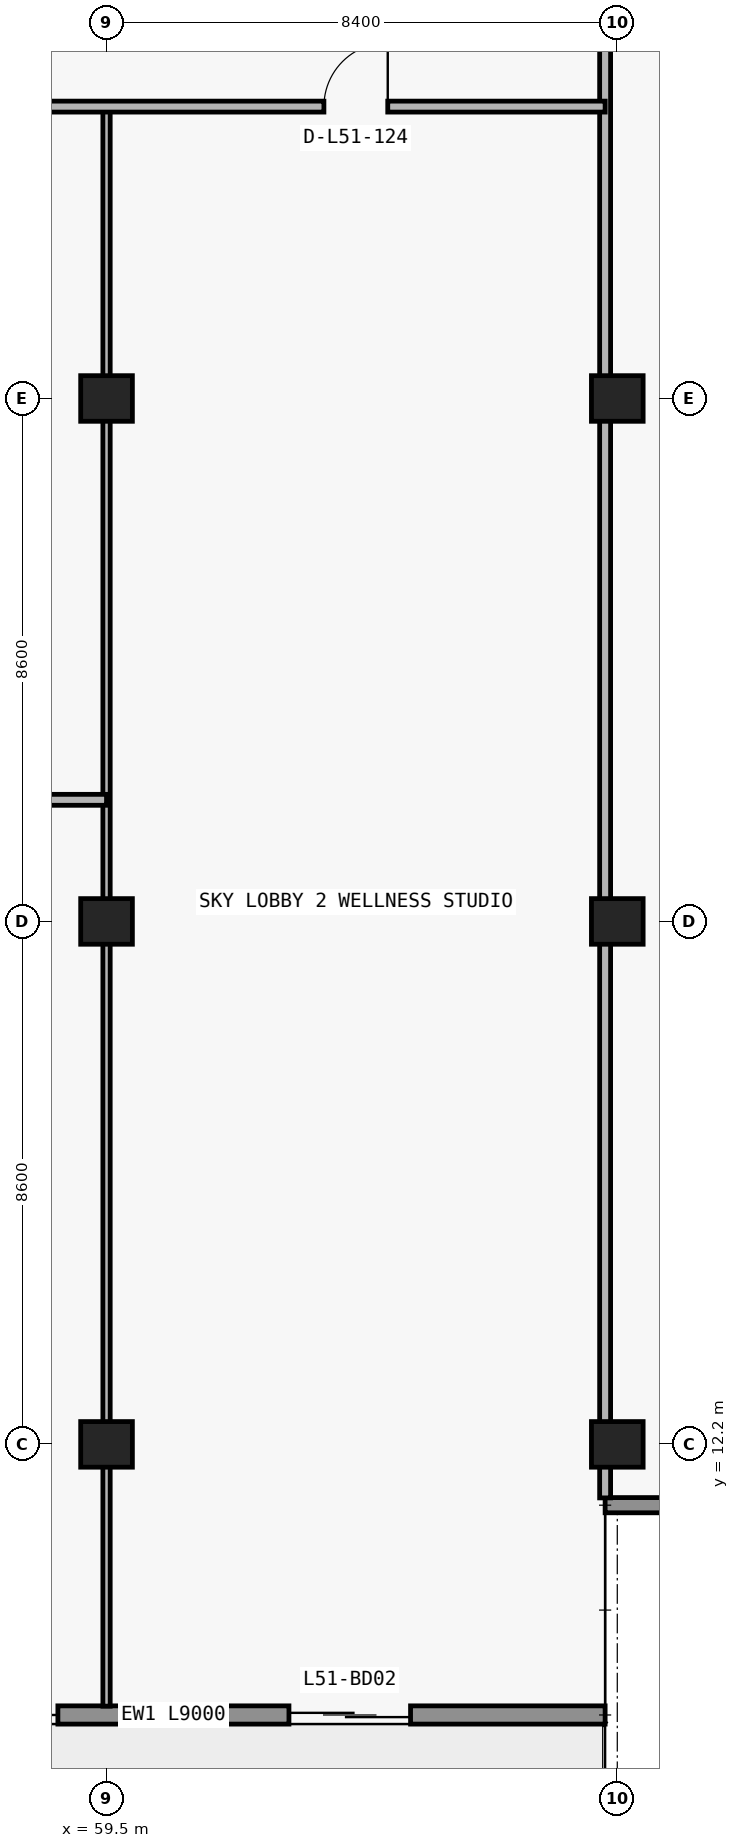
"""IFC4 building model, lengths in metres.
Left out: names, types, materials, properties, quantities, classifications, styles, units other than length and angle.
Written with IfcOpenShell. Run it as: python <this file> out.ifc"""

import sys

from ifc_helpers import new_model, si_unit, direction, frame, frame_2d, origin, origin_2d, place, context, subcontext, project, spatial, rectangle, extrude, element, fill, save


model = new_model("IFC4")
c1 = context("Model", 3, precision=1e-05, world=origin(), true_north=direction((0.0, 1.0)))
c2 = subcontext(c1, "Body", "Model", "MODEL_VIEW")
j1 = project(units=[si_unit("LENGTHUNIT", "METRE"), si_unit("PLANEANGLEUNIT", "RADIAN")], contexts=[c1])
p1 = place(None, origin())
s1 = spatial("IfcSite", under=j1, at=p1, CompositionType="ELEMENT")
p2 = place(p1, origin())
s2 = spatial("IfcBuilding", under=s1, at=p2, CompositionType="ELEMENT")
p3 = place(p2, frame((0.0, 0.0, 183.6)))
s3 = spatial("IfcBuildingStorey", under=s2, at=p3, CompositionType="ELEMENT", Elevation=183.6)
for number, where, z_axis, x_axis in (
    (1, (59.5, 12.2, 0.0), (0.0, 0.0, 1.0), (1.0, 0.0, 0.0)),
    (2, (67.9, 12.2, 0.0), (0.0, 0.0, 1.0), (1.0, 0.0, 0.0)),
    (3, (59.5, 20.8, 0.0), (0.0, 0.0, 1.0), (1.0, 0.0, 0.0)),
    (4, (67.9, 20.8, 0.0), (0.0, 0.0, 1.0), (1.0, 0.0, 0.0)),
    (5, (59.5, 29.4, 0.0), (0.0, 0.0, 1.0), (1.0, 0.0, 0.0)),
    (6, (67.9, 29.4, 0.0), (0.0, 0.0, 1.0), (1.0, 0.0, 0.0)),
):
    element("IfcColumn", number, at=place(p3, frame(where, z_axis=z_axis, x_axis=x_axis)), inside=s3, PredefinedType="COLUMN", context=c2, shape_type="SweptSolid", body=[
        extrude(rectangle(XDim=0.85, YDim=0.75, at=origin_2d()), origin(), (0.0, 0.0, 1.0), 4.55),
    ])
p4 = place(p3, frame((67.7, 7.75, 0.0), z_axis=(0.0, 0.0, 1.0), x_axis=(-1.0, 0.0, 0.0)))
e7 = element("IfcWall", 7, at=p4, inside=s3, PredefinedType="STANDARD", context=c2, shape_type="SweptSolid", body=[
    extrude(rectangle(XDim=9.0, YDim=0.3, at=frame_2d((4.5, 0.0))), origin(), (0.0, 0.0, 1.0), 4.55),
])
p5 = place(p4, frame((3.2, 0.0, 0.0)))
e8 = element("IfcOpeningElement", 8, at=p5, cuts=e7, PredefinedType="OPENING", context=c2, shape_type="SweptSolid", body=[
    extrude(rectangle(XDim=2.0, YDim=2.3, at=frame_2d((1.0, 1.15))), frame((0.0, 0.16, 0.0), z_axis=(0.0, -1.0, 0.0), x_axis=(1.0, 0.0, 0.0)), (0.0, 0.0, 1.0), 0.32),
])
p6 = place(p3, frame((67.7, 11.2, 0.0), z_axis=(0.0, 0.0, 1.0), x_axis=(1.0, 0.0, 0.0)))
e9 = element("IfcWall", 9, at=p6, inside=s3, PredefinedType="ELEMENTEDWALL", context=c2, shape_type="SweptSolid", body=[
    extrude(rectangle(XDim=3.85, YDim=0.25, at=frame_2d((1.925, 0.0))), origin(), (0.0, 0.0, 1.0), 4.55),
])
p7 = place(p3, frame((59.5, 7.895, 0.0), z_axis=(0.0, 0.0, 1.0), x_axis=(0.0, 1.0, 0.0)))
e10 = element("IfcWall", 10, at=p7, inside=s3, PredefinedType="PARTITIONING", context=c2, shape_type="SweptSolid", body=[
    extrude(rectangle(XDim=26.305, YDim=0.12, at=frame_2d((13.152, 0.0))), origin(), (0.0, 0.0, 1.0), 3.514),
])
p8 = place(p3, frame((67.7, 11.32, 0.0), z_axis=(0.0, 0.0, 1.0), x_axis=(0.0, 1.0, 0.0)))
e11 = element("IfcWall", 11, at=p8, inside=s3, PredefinedType="PARTITIONING", context=c2, shape_type="SweptSolid", body=[
    extrude(rectangle(XDim=35.56, YDim=0.18, at=frame_2d((17.78, 0.0))), origin(), (0.0, 0.0, 1.0), 3.514),
])
p9 = place(p3, frame((51.32, 22.8, 0.0), z_axis=(0.0, 0.0, 1.0), x_axis=(1.0, 0.0, 0.0)))
e12 = element("IfcWall", 12, at=p9, inside=s3, PredefinedType="PARTITIONING", context=c2, shape_type="SweptSolid", body=[
    extrude(rectangle(XDim=8.18, YDim=0.18, at=frame_2d((4.09, 0.0))), origin(), (0.0, 0.0, 1.0), 4.55),
])
p10 = place(p9, frame((3.59, 0.0, 0.0)))
e13 = element("IfcOpeningElement", 13, at=p10, cuts=e12, PredefinedType="OPENING", context=c2, shape_type="SweptSolid", body=[
    extrude(rectangle(XDim=1.0, YDim=2.2, at=frame_2d((0.5, 1.1))), frame((0.0, 0.1, 0.0), z_axis=(0.0, -1.0, 0.0), x_axis=(1.0, 0.0, 0.0)), (0.0, 0.0, 1.0), 0.2),
])
p11 = place(p3, frame((10.1, 34.2, 0.0), z_axis=(0.0, 0.0, 1.0), x_axis=(1.0, 0.0, 0.0)))
e14 = element("IfcWall", 14, at=p11, inside=s3, PredefinedType="PARTITIONING", context=c2, shape_type="SweptSolid", body=[
    extrude(rectangle(XDim=57.6, YDim=0.18, at=frame_2d((28.8, 0.0))), origin(), (0.0, 0.0, 1.0), 4.55),
])
p12 = place(p11, frame((44.675, 0.0, 0.0)))
e15 = element("IfcOpeningElement", 15, at=p12, cuts=e14, PredefinedType="OPENING", context=c2, shape_type="SweptSolid", body=[
    extrude(rectangle(XDim=1.05, YDim=2.15, at=frame_2d((0.525, 1.075))), frame((0.0, 0.1, 0.0), z_axis=(0.0, -1.0, 0.0), x_axis=(1.0, 0.0, 0.0)), (0.0, 0.0, 1.0), 0.2),
])
p13 = place(p11, frame((52.975, 0.0, 0.0)))
e16 = element("IfcOpeningElement", 16, at=p13, cuts=e14, PredefinedType="OPENING", context=c2, shape_type="SweptSolid", body=[
    extrude(rectangle(XDim=1.05, YDim=2.15, at=frame_2d((0.525, 1.075))), frame((0.0, 0.1, 0.0), z_axis=(0.0, -1.0, 0.0), x_axis=(1.0, 0.0, 0.0)), (0.0, 0.0, 1.0), 0.2),
])
p14 = place(p11, frame((3.575, 0.0, 0.0)))
e17 = element("IfcOpeningElement", 17, at=p14, cuts=e14, PredefinedType="OPENING", context=c2, shape_type="SweptSolid", body=[
    extrude(rectangle(XDim=1.05, YDim=2.15, at=frame_2d((0.525, 1.075))), frame((0.0, 0.1, 0.0), z_axis=(0.0, -1.0, 0.0), x_axis=(1.0, 0.0, 0.0)), (0.0, 0.0, 1.0), 0.2),
])
p15 = place(p11, frame((11.875, 0.0, 0.0)))
e18 = element("IfcOpeningElement", 18, at=p15, cuts=e14, PredefinedType="OPENING", context=c2, shape_type="SweptSolid", body=[
    extrude(rectangle(XDim=1.05, YDim=2.15, at=frame_2d((0.525, 1.075))), frame((0.0, 0.1, 0.0), z_axis=(0.0, -1.0, 0.0), x_axis=(1.0, 0.0, 0.0)), (0.0, 0.0, 1.0), 0.2),
])
p16 = place(p11, frame((20.275, 0.0, 0.0)))
e19 = element("IfcOpeningElement", 19, at=p16, cuts=e14, PredefinedType="OPENING", context=c2, shape_type="SweptSolid", body=[
    extrude(rectangle(XDim=1.05, YDim=2.15, at=frame_2d((0.525, 1.075))), frame((0.0, 0.1, 0.0), z_axis=(0.0, -1.0, 0.0), x_axis=(1.0, 0.0, 0.0)), (0.0, 0.0, 1.0), 0.2),
])
p17 = place(p11, frame((28.3, 0.0, 0.0)))
e20 = element("IfcOpeningElement", 20, at=p17, cuts=e14, PredefinedType="OPENING", context=c2, shape_type="SweptSolid", body=[
    extrude(rectangle(XDim=1.0, YDim=2.2, at=frame_2d((0.5, 1.1))), frame((0.0, 0.1, 0.0), z_axis=(0.0, -1.0, 0.0), x_axis=(1.0, 0.0, 0.0)), (0.0, 0.0, 1.0), 0.2),
])
p18 = place(p11, frame((36.3, 0.0, 0.0)))
e21 = element("IfcOpeningElement", 21, at=p18, cuts=e14, PredefinedType="OPENING", context=c2, shape_type="SweptSolid", body=[
    extrude(rectangle(XDim=1.0, YDim=2.2, at=frame_2d((0.5, 1.1))), frame((0.0, 0.1, 0.0), z_axis=(0.0, -1.0, 0.0), x_axis=(1.0, 0.0, 0.0)), (0.0, 0.0, 1.0), 0.2),
])
p19 = place(p5, origin())
e22 = element("IfcDoor", 22, at=p19, inside=s3, OperationType="DOUBLE_DOOR_SLIDING", PredefinedType="DOOR", context=c2, shape_type="SweptSolid", body=[
    extrude(rectangle(XDim=2.0, YDim=2.3, at=frame_2d((1.0, 1.15))), frame((0.0, 0.025, 0.0), z_axis=(0.0, -1.0, 0.0), x_axis=(1.0, 0.0, 0.0)), (0.0, 0.0, 1.0), 0.05),
])
fill(e8, e22)
p20 = place(p13, origin())
e23 = element("IfcDoor", 23, at=p20, inside=s3, OperationType="SINGLE_SWING_RIGHT", PredefinedType="DOOR", context=c2, shape_type="SweptSolid", body=[
    extrude(rectangle(XDim=1.05, YDim=2.15, at=frame_2d((0.525, 1.075))), frame((0.0, 0.025, 0.0), z_axis=(0.0, -1.0, 0.0), x_axis=(1.0, 0.0, 0.0)), (0.0, 0.0, 1.0), 0.05),
])
fill(e16, e23)
save(model, sys.argv[1])
